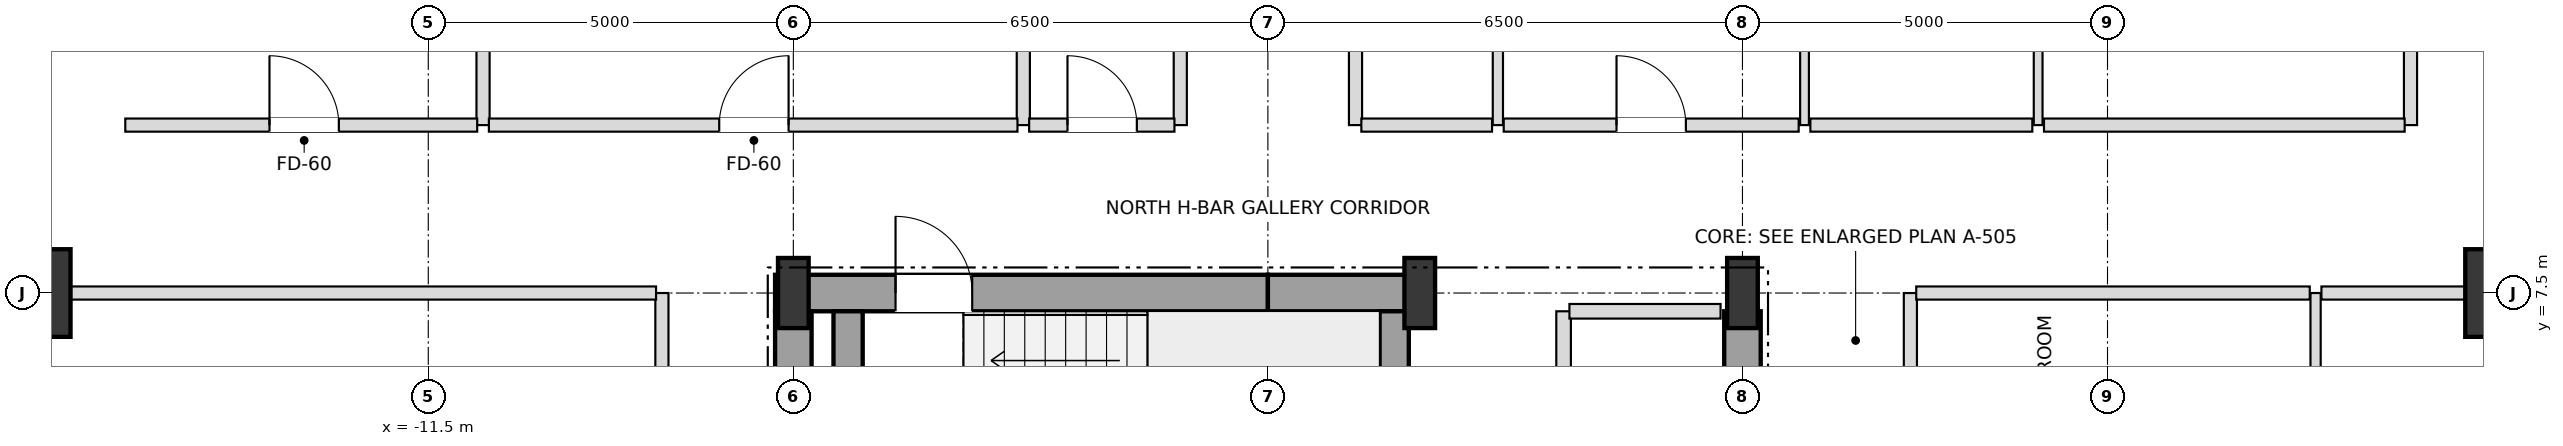
"""IFC4 building model, lengths in metres.
Left out: names, types, materials, properties, quantities, classifications, styles, units other than length and angle.
Written with IfcOpenShell. Run it as: python <this file> out.ifc"""

import sys

from ifc_helpers import new_model, si_unit, direction, frame, frame_2d, origin, origin_2d, place, context, subcontext, project, spatial, rectangle, i_section, extrude, element, fill, save


model = new_model("IFC4")
c1 = context("Model", 3, precision=1e-05, world=origin(), true_north=direction((0.0, 1.0)))
c2 = subcontext(c1, "Body", "Model", "MODEL_VIEW")
j1 = project(units=[si_unit("LENGTHUNIT", "METRE"), si_unit("PLANEANGLEUNIT", "RADIAN")], contexts=[c1])
p1 = place(None, origin())
s1 = spatial("IfcSite", under=j1, at=p1, CompositionType="ELEMENT")
p2 = place(p1, origin())
s2 = spatial("IfcBuilding", under=s1, at=p2, CompositionType="ELEMENT")
p3 = place(p2, frame((0.0, 0.0, 154.8)))
s3 = spatial("IfcBuildingStorey", under=s2, at=p3, CompositionType="ELEMENT", Elevation=154.8)
for number, where, z_axis, x_axis in (
    (1, (-6.5, 7.5, 0.0), (0.0, 0.0, 1.0), (1.0, 0.0, 0.0)),
    (2, (2.08, 7.5, 0.0), (0.0, 0.0, 1.0), (1.0, 0.0, 0.0)),
    (3, (6.5, 7.5, 0.0), (0.0, 0.0, 1.0), (1.0, 0.0, 0.0)),
):
    element("IfcColumn", number, at=place(p3, frame(where, z_axis=z_axis, x_axis=x_axis)), inside=s3, PredefinedType="COLUMN", context=c2, shape_type="SweptSolid", body=[
        extrude(i_section(OverallWidth=0.42, OverallDepth=0.96, WebThickness=0.022, FlangeThickness=0.034, at=origin_2d()), origin(), (0.0, 0.0, 1.0), 3.6),
    ])
for number, where, z_axis, x_axis in (
    (4, (17.0, 7.5, 0.0), (0.0, 0.0, 1.0), (1.0, 0.0, 0.0)),
    (5, (-17.0, 7.5, 0.0), (0.0, 0.0, 1.0), (1.0, 0.0, 0.0)),
):
    element("IfcColumn", number, at=place(p3, frame(where, z_axis=z_axis, x_axis=x_axis)), inside=s3, PredefinedType="USERDEFINED", context=c2, shape_type="SweptSolid", body=[
        extrude(rectangle(XDim=1.2, YDim=1.2, at=origin_2d()), origin(), (0.0, 0.0, 1.0), 3.6),
    ])
p4 = place(p3, frame((-6.75, 7.5, 0.0), z_axis=(0.0, 0.0, 1.0), x_axis=(1.0, 0.0, 0.0)))
e6 = element("IfcWall", 6, at=p4, inside=s3, PredefinedType="SHEAR", context=c2, shape_type="SweptSolid", body=[
    extrude(rectangle(XDim=6.75, YDim=0.5, at=frame_2d((3.375, 0.0))), origin(), (0.0, 0.0, 1.0), 3.38),
])
p5 = place(p4, frame((1.65, 0.0, 0.0)))
e7 = element("IfcOpeningElement", 7, at=p5, cuts=e6, PredefinedType="OPENING", context=c2, shape_type="SweptSolid", body=[
    extrude(rectangle(XDim=1.05, YDim=2.15, at=frame_2d((0.525, 1.075))), frame((0.0, 0.26, 0.0), z_axis=(0.0, -1.0, 0.0), x_axis=(1.0, 0.0, 0.0)), (0.0, 0.0, 1.0), 0.52),
])
p6 = place(p3, frame((0.0, 7.5, 0.0), z_axis=(0.0, 0.0, 1.0), x_axis=(1.0, 0.0, 0.0)))
e8 = element("IfcWall", 8, at=p6, inside=s3, PredefinedType="SHEAR", context=c2, shape_type="SweptSolid", body=[
    extrude(rectangle(XDim=2.08, YDim=0.5, at=frame_2d((1.04, 0.0))), origin(), (0.0, 0.0, 1.0), 3.38),
])
for number, where, z_axis, x_axis in (
    (9, (-6.5, 3.95, 0.0), (0.0, 0.0, 1.0), (0.0, 1.0, 0.0)),
    (10, (6.5, 3.95, 0.0), (0.0, 0.0, 1.0), (0.0, 1.0, 0.0)),
):
    element("IfcWall", number, at=place(p3, frame(where, z_axis=z_axis, x_axis=x_axis)), inside=s3, PredefinedType="SHEAR", context=c2, shape_type="SweptSolid", body=[
        extrude(rectangle(XDim=3.3, YDim=0.5, at=frame_2d((1.65, 0.0))), origin(), (0.0, 0.0, 1.0), 3.38),
    ])
for number, where, z_axis, x_axis in (
    (11, (1.73, 3.95, 0.0), (0.0, 0.0, 1.0), (0.0, 1.0, 0.0)),
    (12, (-5.75, 3.95, 0.0), (0.0, 0.0, 1.0), (0.0, 1.0, 0.0)),
):
    element("IfcWall", number, at=place(p3, frame(where, z_axis=z_axis, x_axis=x_axis)), inside=s3, PredefinedType="SHEAR", context=c2, shape_type="SweptSolid", body=[
        extrude(rectangle(XDim=3.3, YDim=0.4, at=frame_2d((1.65, 0.0))), origin(), (0.0, 0.0, 1.0), 3.38),
    ])
p7 = place(p3, frame((-10.75, 9.8, 0.0), z_axis=(0.0, 0.0, 1.0), x_axis=(0.0, 1.0, 0.0)))
e13 = element("IfcWall", 13, at=p7, inside=s3, PredefinedType="PARTITIONING", context=c2, shape_type="SweptSolid", body=[
    extrude(rectangle(XDim=13.35, YDim=0.18, at=frame_2d((6.675, 0.0))), origin(), (0.0, 0.0, 1.0), 2.816),
])
p8 = place(p3, frame((-8.3, -7.5, 0.0), z_axis=(0.0, 0.0, 1.0), x_axis=(0.0, 1.0, 0.0)))
e14 = element("IfcWall", 14, at=p8, inside=s3, PredefinedType="PARTITIONING", context=c2, shape_type="SweptSolid", body=[
    extrude(rectangle(XDim=15.0, YDim=0.18, at=frame_2d((7.5, 0.0))), origin(), (0.0, 0.0, 1.0), 3.38),
])
p9 = place(p8, frame((0.605, 0.0, 0.0)))
e15 = element("IfcOpeningElement", 15, at=p9, cuts=e14, PredefinedType="OPENING", context=c2, shape_type="SweptSolid", body=[
    extrude(rectangle(XDim=0.95, YDim=2.15, at=frame_2d((0.475, 1.075))), frame((0.0, 0.1, 0.0), z_axis=(0.0, -1.0, 0.0), x_axis=(1.0, 0.0, 0.0)), (0.0, 0.0, 1.0), 0.2),
])
p10 = place(p8, frame((2.605, 0.0, 0.0)))
e16 = element("IfcOpeningElement", 16, at=p10, cuts=e14, PredefinedType="OPENING", context=c2, shape_type="SweptSolid", body=[
    extrude(rectangle(XDim=0.95, YDim=2.15, at=frame_2d((0.475, 1.075))), frame((0.0, 0.1, 0.0), z_axis=(0.0, -1.0, 0.0), x_axis=(1.0, 0.0, 0.0)), (0.0, 0.0, 1.0), 0.2),
])
for number, where, z_axis, x_axis in (
    (17, (-3.35, 9.8, 0.0), (0.0, 0.0, 1.0), (0.0, 1.0, 0.0)),
    (18, (-1.2, 9.8, 0.0), (0.0, 0.0, 1.0), (0.0, 1.0, 0.0)),
    (19, (1.2, 9.8, 0.0), (0.0, 0.0, 1.0), (0.0, 1.0, 0.0)),
):
    element("IfcWall", number, at=place(p3, frame(where, z_axis=z_axis, x_axis=x_axis)), inside=s3, PredefinedType="PARTITIONING", context=c2, shape_type="SweptSolid", body=[
        extrude(rectangle(XDim=13.35, YDim=0.18, at=frame_2d((6.675, 0.0))), origin(), (0.0, 0.0, 1.0), 2.816),
    ])
p11 = place(p3, frame((3.15, 9.8, 0.0), z_axis=(0.0, 0.0, 1.0), x_axis=(0.0, 1.0, 0.0)))
e20 = element("IfcWall", 20, at=p11, inside=s3, PredefinedType="PARTITIONING", context=c2, shape_type="SweptSolid", body=[
    extrude(rectangle(XDim=7.35, YDim=0.14, at=frame_2d((3.675, 0.0))), origin(), (0.0, 0.0, 1.0), 3.38),
])
p12 = place(p11, frame((3.22, 0.0, 0.0)))
e21 = element("IfcOpeningElement", 21, at=p12, cuts=e20, PredefinedType="OPENING", context=c2, shape_type="SweptSolid", body=[
    extrude(rectangle(XDim=0.9, YDim=2.1, at=frame_2d((0.45, 1.05))), frame((0.0, 0.08, 0.0), z_axis=(0.0, -1.0, 0.0), x_axis=(1.0, 0.0, 0.0)), (0.0, 0.0, 1.0), 0.16),
])
p13 = place(p3, frame((4.05, 4.2, 0.0), z_axis=(0.0, 0.0, 1.0), x_axis=(0.0, 1.0, 0.0)))
e22 = element("IfcWall", 22, at=p13, inside=s3, PredefinedType="SOLIDWALL", context=c2, shape_type="SweptSolid", body=[
    extrude(rectangle(XDim=3.05, YDim=0.2, at=frame_2d((1.525, 0.0))), origin(), (0.0, 0.0, 1.0), 3.38),
])
p14 = place(p13, frame((0.975, 0.0, 0.0)))
e23 = element("IfcOpeningElement", 23, at=p14, cuts=e22, PredefinedType="OPENING", context=c2, shape_type="SweptSolid", body=[
    extrude(rectangle(XDim=0.95, YDim=2.15, at=frame_2d((0.475, 1.075))), frame((0.0, 0.11, 0.0), z_axis=(0.0, -1.0, 0.0), x_axis=(1.0, 0.0, 0.0)), (0.0, 0.0, 1.0), 0.22),
])
p15 = place(p3, frame((7.35, 9.8, 0.0), z_axis=(0.0, 0.0, 1.0), x_axis=(0.0, 1.0, 0.0)))
e24 = element("IfcWall", 24, at=p15, inside=s3, PredefinedType="PARTITIONING", context=c2, shape_type="SweptSolid", body=[
    extrude(rectangle(XDim=13.35, YDim=0.12, at=frame_2d((6.675, 0.0))), origin(), (0.0, 0.0, 1.0), 2.816),
])
p16 = place(p15, frame((3.195, 0.0, 0.0)))
e25 = element("IfcOpeningElement", 25, at=p16, cuts=e24, PredefinedType="OPENING", context=c2, shape_type="SweptSolid", body=[
    extrude(rectangle(XDim=0.95, YDim=2.1, at=frame_2d((0.475, 1.05))), frame((0.0, 0.07, 0.0), z_axis=(0.0, -1.0, 0.0), x_axis=(1.0, 0.0, 0.0)), (0.0, 0.0, 1.0), 0.14),
])
p17 = place(p15, frame((11.051, 0.0, 0.0)))
e26 = element("IfcOpeningElement", 26, at=p17, cuts=e24, PredefinedType="OPENING", context=c2, shape_type="SweptSolid", body=[
    extrude(rectangle(XDim=0.9, YDim=2.1, at=frame_2d((0.45, 1.05))), frame((0.0, 0.07, 0.0), z_axis=(0.0, -1.0, 0.0), x_axis=(1.0, 0.0, 0.0)), (0.0, 0.0, 1.0), 0.14),
])
p18 = place(p3, frame((8.8, -7.5, 0.0), z_axis=(0.0, 0.0, 1.0), x_axis=(0.0, 1.0, 0.0)))
e27 = element("IfcWall", 27, at=p18, inside=s3, PredefinedType="PARTITIONING", context=c2, shape_type="SweptSolid", body=[
    extrude(rectangle(XDim=15.0, YDim=0.18, at=frame_2d((7.5, 0.0))), origin(), (0.0, 0.0, 1.0), 3.38),
])
p19 = place(p18, frame((3.475, 0.0, 0.0)))
e28 = element("IfcOpeningElement", 28, at=p19, cuts=e27, PredefinedType="OPENING", context=c2, shape_type="SweptSolid", body=[
    extrude(rectangle(XDim=0.95, YDim=2.15, at=frame_2d((0.475, 1.075))), frame((0.0, 0.1, 0.0), z_axis=(0.0, -1.0, 0.0), x_axis=(1.0, 0.0, 0.0)), (0.0, 0.0, 1.0), 0.2),
])
p20 = place(p3, frame((10.55, 9.8, 0.0), z_axis=(0.0, 0.0, 1.0), x_axis=(0.0, 1.0, 0.0)))
e29 = element("IfcWall", 29, at=p20, inside=s3, PredefinedType="PARTITIONING", context=c2, shape_type="SweptSolid", body=[
    extrude(rectangle(XDim=13.35, YDim=0.12, at=frame_2d((6.675, 0.0))), origin(), (0.0, 0.0, 1.0), 2.816),
])
p21 = place(p20, frame((3.713, 0.0, 0.0)))
e30 = element("IfcOpeningElement", 30, at=p21, cuts=e29, PredefinedType="OPENING", context=c2, shape_type="SweptSolid", body=[
    extrude(rectangle(XDim=0.95, YDim=2.1, at=frame_2d((0.475, 1.05))), frame((0.0, 0.07, 0.0), z_axis=(0.0, -1.0, 0.0), x_axis=(1.0, 0.0, 0.0)), (0.0, 0.0, 1.0), 0.14),
])
p22 = place(p20, frame((11.051, 0.0, 0.0)))
e31 = element("IfcOpeningElement", 31, at=p22, cuts=e29, PredefinedType="OPENING", context=c2, shape_type="SweptSolid", body=[
    extrude(rectangle(XDim=0.9, YDim=2.1, at=frame_2d((0.45, 1.05))), frame((0.0, 0.07, 0.0), z_axis=(0.0, -1.0, 0.0), x_axis=(1.0, 0.0, 0.0)), (0.0, 0.0, 1.0), 0.14),
])
p23 = place(p3, frame((14.35, -7.5, 0.0), z_axis=(0.0, 0.0, 1.0), x_axis=(0.0, 1.0, 0.0)))
e32 = element("IfcWall", 32, at=p23, inside=s3, PredefinedType="PARTITIONING", context=c2, shape_type="SweptSolid", body=[
    extrude(rectangle(XDim=15.0, YDim=0.14, at=frame_2d((7.5, 0.0))), origin(), (0.0, 0.0, 1.0), 3.38),
])
p24 = place(p23, frame((3.475, 0.0, 0.0)))
e33 = element("IfcOpeningElement", 33, at=p24, cuts=e32, PredefinedType="OPENING", context=c2, shape_type="SweptSolid", body=[
    extrude(rectangle(XDim=0.95, YDim=2.1, at=frame_2d((0.475, 1.05))), frame((0.0, 0.08, 0.0), z_axis=(0.0, -1.0, 0.0), x_axis=(1.0, 0.0, 0.0)), (0.0, 0.0, 1.0), 0.16),
])
p25 = place(p3, frame((15.65, 9.8, 0.0), z_axis=(0.0, 0.0, 1.0), x_axis=(0.0, 1.0, 0.0)))
e34 = element("IfcWall", 34, at=p25, inside=s3, PredefinedType="PARTITIONING", context=c2, shape_type="SweptSolid", body=[
    extrude(rectangle(XDim=7.35, YDim=0.18, at=frame_2d((3.675, 0.0))), origin(), (0.0, 0.0, 1.0), 2.736),
])
p26 = place(p3, frame((4.13, 7.25, 0.0), z_axis=(0.0, 0.0, 1.0), x_axis=(1.0, 0.0, 0.0)))
e35 = element("IfcWall", 35, at=p26, inside=s3, PredefinedType="SOLIDWALL", context=c2, shape_type="SweptSolid", body=[
    extrude(rectangle(XDim=2.07, YDim=0.2, at=frame_2d((1.035, 0.0))), origin(), (0.0, 0.0, 1.0), 3.38),
])
p27 = place(p3, frame((-20.15, 7.5, 0.0), z_axis=(0.0, 0.0, 1.0), x_axis=(1.0, 0.0, 0.0)))
e36 = element("IfcWall", 36, at=p27, inside=s3, PredefinedType="PARTITIONING", context=c2, shape_type="SweptSolid", body=[
    extrude(rectangle(XDim=11.77, YDim=0.18, at=frame_2d((5.885, 0.0))), origin(), (0.0, 0.0, 1.0), 2.816),
])
p28 = place(p3, frame((8.88, 7.5, 0.0), z_axis=(0.0, 0.0, 1.0), x_axis=(1.0, 0.0, 0.0)))
e37 = element("IfcWall", 37, at=p28, inside=s3, PredefinedType="PARTITIONING", context=c2, shape_type="SweptSolid", body=[
    extrude(rectangle(XDim=5.39, YDim=0.18, at=frame_2d((2.695, 0.0))), origin(), (0.0, 0.0, 1.0), 2.816),
])
p29 = place(p3, frame((14.43, 7.5, 0.0), z_axis=(0.0, 0.0, 1.0), x_axis=(1.0, 0.0, 0.0)))
e38 = element("IfcWall", 38, at=p29, inside=s3, PredefinedType="PARTITIONING", context=c2, shape_type="SweptSolid", body=[
    extrude(rectangle(XDim=5.72, YDim=0.18, at=frame_2d((2.86, 0.0))), origin(), (0.0, 0.0, 1.0), 2.816),
])
p30 = place(p3, frame((-15.65, 9.8, 0.0), z_axis=(0.0, 0.0, 1.0), x_axis=(1.0, 0.0, 0.0)))
e39 = element("IfcWall", 39, at=p30, inside=s3, PredefinedType="PARTITIONING", context=c2, shape_type="SweptSolid", body=[
    extrude(rectangle(XDim=4.82, YDim=0.18, at=frame_2d((2.41, 0.0))), origin(), (0.0, 0.0, 1.0), 3.38),
])
p31 = place(p30, frame((1.975, 0.0, 0.0)))
e40 = element("IfcOpeningElement", 40, at=p31, cuts=e39, PredefinedType="OPENING", context=c2, shape_type="SweptSolid", body=[
    extrude(rectangle(XDim=0.95, YDim=2.15, at=frame_2d((0.475, 1.075))), frame((0.0, 0.1, 0.0), z_axis=(0.0, -1.0, 0.0), x_axis=(1.0, 0.0, 0.0)), (0.0, 0.0, 1.0), 0.2),
])
p32 = place(p3, frame((-10.67, 9.8, 0.0), z_axis=(0.0, 0.0, 1.0), x_axis=(1.0, 0.0, 0.0)))
e41 = element("IfcWall", 41, at=p32, inside=s3, PredefinedType="PARTITIONING", context=c2, shape_type="SweptSolid", body=[
    extrude(rectangle(XDim=7.24, YDim=0.18, at=frame_2d((3.62, 0.0))), origin(), (0.0, 0.0, 1.0), 2.816),
])
p33 = place(p32, frame((3.155, 0.0, 0.0)))
e42 = element("IfcOpeningElement", 42, at=p33, cuts=e41, PredefinedType="OPENING", context=c2, shape_type="SweptSolid", body=[
    extrude(rectangle(XDim=0.95, YDim=2.15, at=frame_2d((0.475, 1.075))), frame((0.0, 0.1, 0.0), z_axis=(0.0, -1.0, 0.0), x_axis=(1.0, 0.0, 0.0)), (0.0, 0.0, 1.0), 0.2),
])
p34 = place(p3, frame((-3.27, 9.8, 0.0), z_axis=(0.0, 0.0, 1.0), x_axis=(1.0, 0.0, 0.0)))
e43 = element("IfcWall", 43, at=p34, inside=s3, PredefinedType="PARTITIONING", context=c2, shape_type="SweptSolid", body=[
    extrude(rectangle(XDim=1.99, YDim=0.18, at=frame_2d((0.995, 0.0))), origin(), (0.0, 0.0, 1.0), 3.38),
])
p35 = place(p34, frame((0.525, 0.0, 0.0)))
e44 = element("IfcOpeningElement", 44, at=p35, cuts=e43, PredefinedType="OPENING", context=c2, shape_type="SweptSolid", body=[
    extrude(rectangle(XDim=0.95, YDim=2.15, at=frame_2d((0.475, 1.075))), frame((0.0, 0.1, 0.0), z_axis=(0.0, -1.0, 0.0), x_axis=(1.0, 0.0, 0.0)), (0.0, 0.0, 1.0), 0.2),
])
p36 = place(p3, frame((1.28, 9.8, 0.0), z_axis=(0.0, 0.0, 1.0), x_axis=(1.0, 0.0, 0.0)))
e45 = element("IfcWall", 45, at=p36, inside=s3, PredefinedType="PARTITIONING", context=c2, shape_type="SweptSolid", body=[
    extrude(rectangle(XDim=1.79, YDim=0.18, at=frame_2d((0.895, 0.0))), origin(), (0.0, 0.0, 1.0), 3.38),
])
p37 = place(p3, frame((3.23, 9.8, 0.0), z_axis=(0.0, 0.0, 1.0), x_axis=(1.0, 0.0, 0.0)))
e46 = element("IfcWall", 46, at=p37, inside=s3, PredefinedType="PARTITIONING", context=c2, shape_type="SweptSolid", body=[
    extrude(rectangle(XDim=4.04, YDim=0.18, at=frame_2d((2.02, 0.0))), origin(), (0.0, 0.0, 1.0), 2.816),
])
p38 = place(p37, frame((1.545, 0.0, 0.0)))
e47 = element("IfcOpeningElement", 47, at=p38, cuts=e46, PredefinedType="OPENING", context=c2, shape_type="SweptSolid", body=[
    extrude(rectangle(XDim=0.95, YDim=2.15, at=frame_2d((0.475, 1.075))), frame((0.0, 0.1, 0.0), z_axis=(0.0, -1.0, 0.0), x_axis=(1.0, 0.0, 0.0)), (0.0, 0.0, 1.0), 0.2),
])
p39 = place(p3, frame((7.43, 9.8, 0.0), z_axis=(0.0, 0.0, 1.0), x_axis=(1.0, 0.0, 0.0)))
e48 = element("IfcWall", 48, at=p39, inside=s3, PredefinedType="PARTITIONING", context=c2, shape_type="SweptSolid", body=[
    extrude(rectangle(XDim=3.04, YDim=0.18, at=frame_2d((1.52, 0.0))), origin(), (0.0, 0.0, 1.0), 3.38),
])
p40 = place(p3, frame((10.63, 9.8, 0.0), z_axis=(0.0, 0.0, 1.0), x_axis=(1.0, 0.0, 0.0)))
e49 = element("IfcWall", 49, at=p40, inside=s3, PredefinedType="PARTITIONING", context=c2, shape_type="SweptSolid", body=[
    extrude(rectangle(XDim=4.94, YDim=0.18, at=frame_2d((2.47, 0.0))), origin(), (0.0, 0.0, 1.0), 3.38),
])
p41 = place(p5, origin())
e50 = element("IfcDoor", 50, at=p41, inside=s3, OperationType="SINGLE_SWING_LEFT", PredefinedType="DOOR", context=c2, shape_type="SweptSolid", body=[
    extrude(rectangle(XDim=1.05, YDim=2.15, at=frame_2d((0.525, 1.075))), frame((0.0, 0.025, 0.0), z_axis=(0.0, -1.0, 0.0), x_axis=(1.0, 0.0, 0.0)), (0.0, 0.0, 1.0), 0.05),
])
fill(e7, e50)
p42 = place(p31, origin())
e51 = element("IfcDoor", 51, at=p42, inside=s3, OperationType="SINGLE_SWING_LEFT", PredefinedType="DOOR", context=c2, shape_type="SweptSolid", body=[
    extrude(rectangle(XDim=0.95, YDim=2.15, at=frame_2d((0.475, 1.075))), frame((0.0, 0.025, 0.0), z_axis=(0.0, -1.0, 0.0), x_axis=(1.0, 0.0, 0.0)), (0.0, 0.0, 1.0), 0.05),
])
fill(e40, e51)
p43 = place(p33, origin())
e52 = element("IfcDoor", 52, at=p43, inside=s3, OperationType="SINGLE_SWING_RIGHT", PredefinedType="DOOR", context=c2, shape_type="SweptSolid", body=[
    extrude(rectangle(XDim=0.95, YDim=2.15, at=frame_2d((0.475, 1.075))), frame((0.0, 0.025, 0.0), z_axis=(0.0, -1.0, 0.0), x_axis=(1.0, 0.0, 0.0)), (0.0, 0.0, 1.0), 0.05),
])
fill(e42, e52)
p44 = place(p35, origin())
e53 = element("IfcDoor", 53, at=p44, inside=s3, OperationType="SINGLE_SWING_LEFT", PredefinedType="DOOR", context=c2, shape_type="SweptSolid", body=[
    extrude(rectangle(XDim=0.95, YDim=2.15, at=frame_2d((0.475, 1.075))), frame((0.0, 0.025, 0.0), z_axis=(0.0, -1.0, 0.0), x_axis=(1.0, 0.0, 0.0)), (0.0, 0.0, 1.0), 0.05),
])
fill(e44, e53)
p45 = place(p38, origin())
e54 = element("IfcDoor", 54, at=p45, inside=s3, OperationType="SINGLE_SWING_LEFT", PredefinedType="DOOR", context=c2, shape_type="SweptSolid", body=[
    extrude(rectangle(XDim=0.95, YDim=2.15, at=frame_2d((0.475, 1.075))), frame((0.0, 0.025, 0.0), z_axis=(0.0, -1.0, 0.0), x_axis=(1.0, 0.0, 0.0)), (0.0, 0.0, 1.0), 0.05),
])
fill(e47, e54)
save(model, sys.argv[1])
